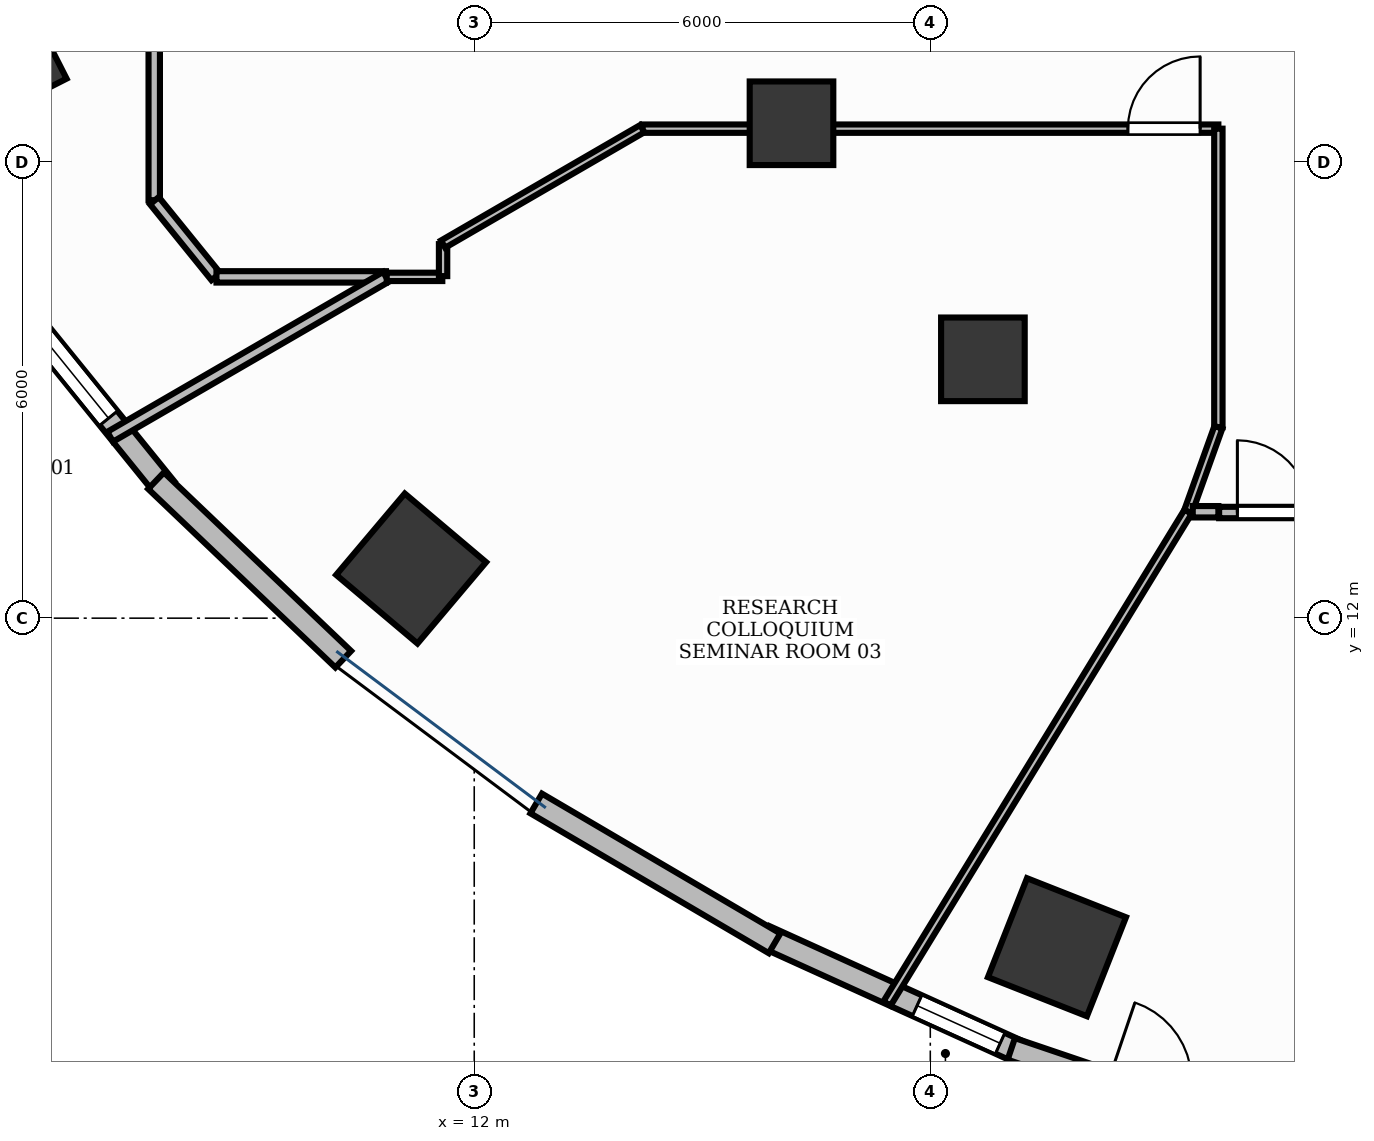
"""IFC4 building model, lengths in metres.
Left out: names, types, materials, properties, quantities, classifications, styles, units other than length and angle.
Written with IfcOpenShell. Run it as: python <this file> out.ifc"""

import sys

from ifc_helpers import new_model, si_unit, direction, frame, frame_2d, origin, origin_2d, place, context, subcontext, project, spatial, rectangle, extrude, element, fill, save


model = new_model("IFC4")
c1 = context("Model", 3, precision=1e-05, world=origin(), true_north=direction((0.0, 1.0)))
c2 = subcontext(c1, "Body", "Model", "MODEL_VIEW")
j1 = project(units=[si_unit("LENGTHUNIT", "METRE"), si_unit("PLANEANGLEUNIT", "RADIAN")], contexts=[c1])
p1 = place(None, origin())
s1 = spatial("IfcSite", under=j1, at=p1, CompositionType="ELEMENT")
p2 = place(p1, origin())
s2 = spatial("IfcBuilding", under=s1, at=p2, CompositionType="ELEMENT")
p3 = place(p2, frame((0.0, 0.0, 76.2)))
s3 = spatial("IfcBuildingStorey", under=s2, at=p3, CompositionType="ELEMENT", Elevation=76.2)
p4 = place(p3, frame((5.696, 19.404, -0.0), z_axis=(0.0, 0.0, 1.0), x_axis=(-0.453057191132, 0.891481453292, 0.0)))
e1 = element("IfcColumn", 1, at=p4, inside=s3, PredefinedType="COLUMN", context=c2, shape_type="SweptSolid", body=[
    extrude(rectangle(XDim=1.4, YDim=1.4, at=origin_2d()), origin(), (0.0, 0.0, 1.0), 3.901),
])
p5 = place(p3, frame((16.174, 18.511, -0.0), z_axis=(0.0, 0.0, 1.0), x_axis=(1.0, 0.0, 0.0)))
e2 = element("IfcColumn", 2, at=p5, inside=s3, PredefinedType="COLUMN", context=c2, shape_type="SweptSolid", body=[
    extrude(rectangle(XDim=1.1, YDim=1.1, at=origin_2d()), origin(), (0.0, 0.0, 1.0), 3.901),
])
p6 = place(p3, frame((11.17, 12.653, -0.0), z_axis=(0.0, 0.0, 1.0), x_axis=(-0.764246456939, 0.644924300253, 0.0)))
e3 = element("IfcColumn", 3, at=p6, inside=s3, PredefinedType="COLUMN", context=c2, shape_type="SweptSolid", body=[
    extrude(rectangle(XDim=1.4, YDim=1.4, at=origin_2d()), origin(), (0.0, 0.0, 1.0), 3.901),
])
p7 = place(p3, frame((18.692, 15.405, -0.0), z_axis=(0.0, 0.0, 1.0), x_axis=(1.0, 0.0, 0.0)))
e4 = element("IfcColumn", 4, at=p7, inside=s3, PredefinedType="COLUMN", context=c2, shape_type="SweptSolid", body=[
    extrude(rectangle(XDim=1.1, YDim=1.1, at=origin_2d()), origin(), (0.0, 0.0, 1.0), 3.901),
])
p8 = place(p3, frame((19.667, 7.671, -0.0), z_axis=(0.0, 0.0, 1.0), x_axis=(-0.930225540858, 0.366988341962, 0.0)))
e5 = element("IfcColumn", 5, at=p8, inside=s3, PredefinedType="COLUMN", context=c2, shape_type="SweptSolid", body=[
    extrude(rectangle(XDim=1.4, YDim=1.4, at=origin_2d()), origin(), (0.0, 0.0, 1.0), 3.901),
])
p9 = place(p3, frame((5.894, 16.23, 0.0), z_axis=(0.0, 0.0, 1.0), x_axis=(0.629295540187, -0.777166084631, 0.0)))
e6 = element("IfcWall", 6, at=p9, inside=s3, PredefinedType="STANDARD", context=c2, shape_type="SweptSolid", body=[
    extrude(rectangle(XDim=3.248, YDim=0.3, at=frame_2d((1.624, 0.0))), origin(), (0.0, 0.0, 1.0), 3.47),
])
p10 = place(p9, frame((0.258, 0.0, 0.9)))
e7 = element("IfcOpeningElement", 7, at=p10, cuts=e6, PredefinedType="OPENING", context=c2, shape_type="SweptSolid", body=[
    extrude(rectangle(XDim=1.8, YDim=2.1, at=frame_2d((0.9, 1.05))), frame((0.0, 0.165, 0.0), z_axis=(0.0, -1.0, 0.0), x_axis=(1.0, 0.0, 0.0)), (0.0, 0.0, 1.0), 0.33),
])
p11 = place(p3, frame((15.822, 7.812, 0.0), z_axis=(0.0, 0.0, 1.0), x_axis=(0.910608120407, -0.413270917254, 0.0)))
e8 = element("IfcWall", 8, at=p11, inside=s3, PredefinedType="STANDARD", context=c2, shape_type="SweptSolid", body=[
    extrude(rectangle(XDim=3.7, YDim=0.3, at=frame_2d((1.85, 0.0))), origin(), (0.0, 0.0, 1.0), 3.9),
])
p12 = place(p11, frame((2.201, 0.0, 0.9)))
e9 = element("IfcOpeningElement", 9, at=p12, cuts=e8, PredefinedType="OPENING", context=c2, shape_type="SweptSolid", body=[
    extrude(rectangle(XDim=1.2, YDim=2.7, at=frame_2d((0.6, 1.35))), frame((0.0, 0.165, 0.0), z_axis=(0.0, -1.0, 0.0), x_axis=(1.0, 0.0, 0.0)), (0.0, 0.0, 1.0), 0.33),
])
p13 = place(p3, frame((19.065, 6.333, 0.0), z_axis=(0.0, 0.0, 1.0), x_axis=(0.947034337234, -0.321132315564, 0.0)))
e10 = element("IfcWall", 10, at=p13, inside=s3, PredefinedType="STANDARD", context=c2, shape_type="SweptSolid", body=[
    extrude(rectangle(XDim=3.79, YDim=0.3, at=frame_2d((1.895, 0.0))), origin(), (0.0, 0.0, 1.0), 3.9),
])
p14 = place(p13, frame((1.345, 0.0, 0.0)))
e11 = element("IfcOpeningElement", 11, at=p14, cuts=e10, PredefinedType="OPENING", context=c2, shape_type="SweptSolid", body=[
    extrude(rectangle(XDim=1.1, YDim=2.15, at=frame_2d((0.55, 1.075))), frame((0.0, 0.165, 0.0), z_axis=(0.0, -1.0, 0.0), x_axis=(1.0, 0.0, 0.0)), (0.0, 0.0, 1.0), 0.33),
])
p15 = place(p3, frame((7.814, 13.808, 0.0), z_axis=(0.0, 0.0, 1.0), x_axis=(0.72369587847, -0.69011902994, 0.0)))
e12 = element("IfcWall", 12, at=p15, inside=s3, PredefinedType="STANDARD", context=c2, shape_type="SweptSolid", body=[
    extrude(rectangle(XDim=3.403, YDim=0.3, at=frame_2d((1.701, 0.0))), origin(), (0.0, 0.0, 1.0), 3.47),
])
p16 = place(p3, frame((12.815, 9.562, 0.0), z_axis=(0.0, 0.0, 1.0), x_axis=(0.8624654944, -0.506115867139, 0.0)))
e13 = element("IfcWall", 13, at=p16, inside=s3, PredefinedType="STANDARD", context=c2, shape_type="SweptSolid", body=[
    extrude(rectangle(XDim=3.635, YDim=0.3, at=frame_2d((1.818, 0.0))), origin(), (0.0, 0.0, 1.0), 3.9),
])
p17 = place(p3, frame((7.79, 31.115, 0.0), z_axis=(0.0, 0.0, 1.0), x_axis=(0.0, -1.0, 0.0)))
e14 = element("IfcWall", 14, at=p17, inside=s3, PredefinedType="PARTITIONING", context=c2, shape_type="SweptSolid", body=[
    extrude(rectangle(XDim=13.617, YDim=0.15, at=frame_2d((6.808, 0.0))), origin(), (0.0, 0.0, 1.0), 2.91),
])
p18 = place(p17, frame((0.24, 0.0, 0.0)))
e15 = element("IfcOpeningElement", 15, at=p18, cuts=e14, PredefinedType="OPENING", context=c2, shape_type="SweptSolid", body=[
    extrude(rectangle(XDim=0.95, YDim=2.15, at=frame_2d((0.475, 1.075))), frame((0.0, 0.09, 0.0), z_axis=(0.0, -1.0, 0.0), x_axis=(1.0, 0.0, 0.0)), (0.0, 0.0, 1.0), 0.18),
])
p19 = place(p3, frame((14.211, 18.44, 0.0), z_axis=(0.0, 0.0, 1.0), x_axis=(1.0, 0.0, 0.0)))
e16 = element("IfcWall", 16, at=p19, inside=s3, PredefinedType="MOVABLE", context=c2, shape_type="SweptSolid", body=[
    extrude(rectangle(XDim=7.579, YDim=0.11, at=frame_2d((3.79, 0.0))), origin(), (0.0, 0.0, 1.0), 2.91),
])
p20 = place(p19, frame((6.389, 0.0, 0.0)))
e17 = element("IfcOpeningElement", 17, at=p20, cuts=e16, PredefinedType="OPENING", context=c2, shape_type="SweptSolid", body=[
    extrude(rectangle(XDim=0.95, YDim=2.15, at=frame_2d((0.475, 1.075))), frame((0.0, 0.07, 0.0), z_axis=(0.0, -1.0, 0.0), x_axis=(1.0, 0.0, 0.0)), (0.0, 0.0, 1.0), 0.14),
])
p21 = place(p3, frame((21.8, 13.39, 0.0), z_axis=(0.0, 0.0, 1.0), x_axis=(1.0, 0.0, 0.0)))
e18 = element("IfcWall", 18, at=p21, inside=s3, PredefinedType="PARTITIONING", context=c2, shape_type="SweptSolid", body=[
    extrude(rectangle(XDim=6.7, YDim=0.15, at=frame_2d((3.35, 0.0))), origin(), (0.0, 0.0, 1.0), 2.91),
])
p22 = place(p21, frame((0.24, 0.0, 0.0)))
e19 = element("IfcOpeningElement", 19, at=p22, cuts=e18, PredefinedType="OPENING", context=c2, shape_type="SweptSolid", body=[
    extrude(rectangle(XDim=0.95, YDim=2.15, at=frame_2d((0.475, 1.075))), frame((0.0, 0.09, 0.0), z_axis=(0.0, -1.0, 0.0), x_axis=(1.0, 0.0, 0.0)), (0.0, 0.0, 1.0), 0.18),
])
p23 = place(p3, frame((7.792, 17.492, 0.0), z_axis=(0.0, 0.0, 1.0), x_axis=(0.629225554682, -0.777222748854, 0.0)))
e20 = element("IfcWall", 20, at=p23, inside=s3, PredefinedType="PARTITIONING", context=c2, shape_type="SweptSolid", body=[
    extrude(rectangle(XDim=1.285, YDim=0.15, at=frame_2d((0.643, 0.0))), origin(), (0.0, 0.0, 1.0), 2.91),
])
p24 = place(p3, frame((8.609, 16.49, 0.0), z_axis=(0.0, 0.0, 1.0), x_axis=(1.0, 0.0, 0.0)))
e21 = element("IfcWall", 21, at=p24, inside=s3, PredefinedType="PARTITIONING", context=c2, shape_type="SweptSolid", body=[
    extrude(rectangle(XDim=2.23, YDim=0.15, at=frame_2d((1.115, 0.0))), origin(), (0.0, 0.0, 1.0), 2.91),
])
p25 = place(p3, frame((10.839, 16.49, 0.0), z_axis=(0.0, 0.0, 1.0), x_axis=(-0.865171113314, -0.501476763856, 0.0)))
e22 = element("IfcWall", 22, at=p25, inside=s3, PredefinedType="PARTITIONING", context=c2, shape_type="SweptSolid", body=[
    extrude(rectangle(XDim=4.194, YDim=0.15, at=frame_2d((2.097, 0.0))), origin(), (0.0, 0.0, 1.0), 2.91),
])
p26 = place(p3, frame((21.79, 18.44, 0.0), z_axis=(0.0, 0.0, 1.0), x_axis=(0.0, -1.0, 0.0)))
e23 = element("IfcWall", 23, at=p26, inside=s3, PredefinedType="MOVABLE", context=c2, shape_type="SweptSolid", body=[
    extrude(rectangle(XDim=3.929, YDim=0.11, at=frame_2d((1.964, 0.0))), origin(), (0.0, 0.0, 1.0), 2.91),
])
p27 = place(p3, frame((21.79, 14.511, 0.0), z_axis=(0.0, 0.0, 1.0), x_axis=(-0.337672177142, -0.941263778536, 0.0)))
e24 = element("IfcWall", 24, at=p27, inside=s3, PredefinedType="MOVABLE", context=c2, shape_type="SweptSolid", body=[
    extrude(rectangle(XDim=1.181, YDim=0.11, at=frame_2d((0.59, 0.0))), origin(), (0.0, 0.0, 1.0), 2.91),
])
p28 = place(p3, frame((21.391, 13.4, 0.0), z_axis=(0.0, 0.0, 1.0), x_axis=(-0.522118984401, -0.852872655282, 0.0)))
e25 = element("IfcWall", 25, at=p28, inside=s3, PredefinedType="MOVABLE", context=c2, shape_type="SweptSolid", body=[
    extrude(rectangle(XDim=7.586, YDim=0.11, at=frame_2d((3.793, 0.0))), origin(), (0.0, 0.0, 1.0), 2.91),
])
p29 = place(p3, frame((10.849, 16.49, 0.0), z_axis=(0.0, 0.0, 1.0), x_axis=(1.0, 0.0, 0.0)))
e26 = element("IfcWall", 26, at=p29, inside=s3, PredefinedType="MOVABLE", context=c2, shape_type="SweptSolid", body=[
    extrude(rectangle(XDim=0.731, YDim=0.11, at=frame_2d((0.366, 0.0))), origin(), (0.0, 0.0, 1.0), 2.91),
])
p30 = place(p3, frame((11.59, 16.5, 0.0), z_axis=(0.0, 0.0, 1.0), x_axis=(0.0, 1.0, 0.0)))
e27 = element("IfcWall", 27, at=p30, inside=s3, PredefinedType="MOVABLE", context=c2, shape_type="SweptSolid", body=[
    extrude(rectangle(XDim=0.421, YDim=0.11, at=frame_2d((0.21, 0.0))), origin(), (0.0, 0.0, 1.0), 2.91),
])
p31 = place(p3, frame((11.59, 16.921, 0.0), z_axis=(0.0, 0.0, 1.0), x_axis=(0.865161287927, 0.50149371469, 0.0)))
e28 = element("IfcWall", 28, at=p31, inside=s3, PredefinedType="MOVABLE", context=c2, shape_type="SweptSolid", body=[
    extrude(rectangle(XDim=3.029, YDim=0.11, at=frame_2d((1.515, 0.0))), origin(), (0.0, 0.0, 1.0), 2.91),
])
p32 = place(p3, frame((21.453, 13.4, 0.0), z_axis=(0.0, 0.0, 1.0), x_axis=(1.0, 0.0, 0.0)))
e29 = element("IfcWall", 29, at=p32, inside=s3, PredefinedType="PARTITIONING", context=c2, shape_type="SweptSolid", body=[
    extrude(rectangle(XDim=0.337, YDim=0.15, at=frame_2d((0.168, 0.0))), origin(), (0.0, 0.0, 1.0), 2.91),
])
p33 = place(p10, origin())
e30 = element("IfcWindow", 30, at=p33, inside=s3, PartitioningType="SINGLE_PANEL", PredefinedType="WINDOW", context=c2, shape_type="SweptSolid", body=[
    extrude(rectangle(XDim=1.8, YDim=2.1, at=frame_2d((0.9, 1.05))), frame((0.0, 0.03, 0.0), z_axis=(0.0, -1.0, 0.0), x_axis=(1.0, 0.0, 0.0)), (0.0, 0.0, 1.0), 0.06),
])
fill(e7, e30)
p34 = place(p12, origin())
e31 = element("IfcWindow", 31, at=p34, inside=s3, PartitioningType="SINGLE_PANEL", PredefinedType="WINDOW", context=c2, shape_type="SweptSolid", body=[
    extrude(rectangle(XDim=1.2, YDim=2.7, at=frame_2d((0.6, 1.35))), frame((0.0, 0.03, 0.0), z_axis=(0.0, -1.0, 0.0), x_axis=(1.0, 0.0, 0.0)), (0.0, 0.0, 1.0), 0.06),
])
fill(e9, e31)
p35 = place(p20, origin())
e32 = element("IfcDoor", 32, at=p35, inside=s3, OperationType="SINGLE_SWING_RIGHT", PredefinedType="DOOR", context=c2, shape_type="SweptSolid", body=[
    extrude(rectangle(XDim=0.95, YDim=2.15, at=frame_2d((0.475, 1.075))), frame((0.0, 0.025, 0.0), z_axis=(0.0, -1.0, 0.0), x_axis=(1.0, 0.0, 0.0)), (0.0, 0.0, 1.0), 0.05),
])
fill(e17, e32)
p36 = place(p22, origin())
e33 = element("IfcDoor", 33, at=p36, inside=s3, OperationType="SINGLE_SWING_LEFT", PredefinedType="DOOR", context=c2, shape_type="SweptSolid", body=[
    extrude(rectangle(XDim=0.95, YDim=2.15, at=frame_2d((0.475, 1.075))), frame((0.0, 0.025, 0.0), z_axis=(0.0, -1.0, 0.0), x_axis=(1.0, 0.0, 0.0)), (0.0, 0.0, 1.0), 0.05),
])
fill(e19, e33)
save(model, sys.argv[1])
